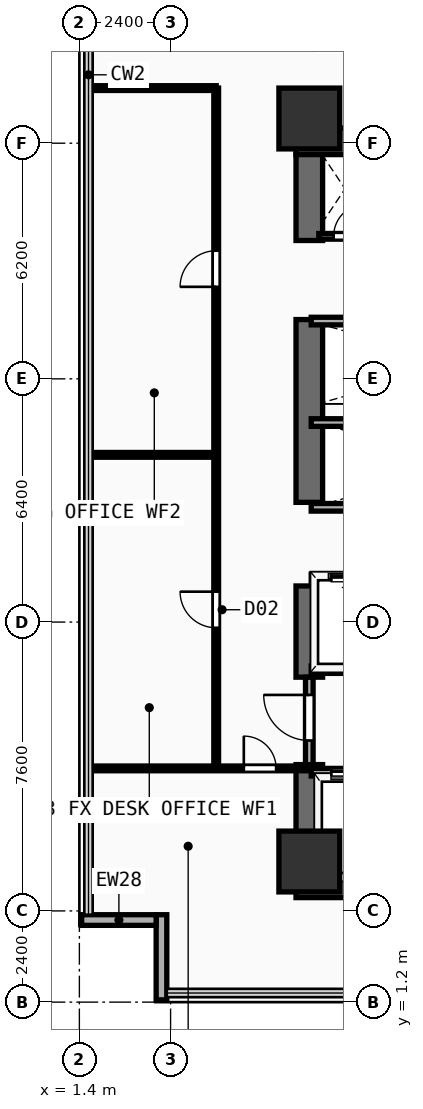
"""IFC4 building model, lengths in metres.
Left out: names, types, materials, properties, quantities, classifications, styles, units other than length and angle.
Written with IfcOpenShell. Run it as: python <this file> out.ifc"""

import sys

from ifc_helpers import new_model, si_unit, direction, frame, frame_2d, origin, origin_2d, place, context, subcontext, project, spatial, rectangle, extrude, element, fill, save


model = new_model("IFC4")
c1 = context("Model", 3, precision=1e-05, world=origin(), true_north=direction((0.0, 1.0)))
c2 = subcontext(c1, "Body", "Model", "MODEL_VIEW")
j1 = project(units=[si_unit("LENGTHUNIT", "METRE"), si_unit("PLANEANGLEUNIT", "RADIAN")], contexts=[c1])
p1 = place(None, origin())
s1 = spatial("IfcSite", under=j1, at=p1, CompositionType="ELEMENT")
p2 = place(p1, origin())
s2 = spatial("IfcBuilding", under=s1, at=p2, CompositionType="ELEMENT")
p3 = place(p2, frame((0.0, 0.0, 71.4)))
s3 = spatial("IfcBuildingStorey", under=s2, at=p3, CompositionType="ELEMENT", Elevation=71.4)
for number, where, z_axis, x_axis in (
    (1, (7.1, 4.3, 0.0), (0.0, 0.0, 1.0), (1.0, 0.0, 0.0)),
    (2, (7.1, 23.85, 0.0), (0.0, 0.0, 1.0), (1.0, 0.0, 0.0)),
):
    element("IfcWall", number, at=place(p3, frame(where, z_axis=z_axis, x_axis=x_axis)), inside=s3, PredefinedType="SHEAR", context=c2, shape_type="SweptSolid", body=[
        extrude(rectangle(XDim=14.05, YDim=0.7, at=frame_2d((7.025, 0.0))), origin(), (0.0, 0.0, 1.0), 3.54),
    ])
p4 = place(p3, frame((7.45, 4.65, 0.0), z_axis=(0.0, 0.0, 1.0), x_axis=(0.0, 1.0, 0.0)))
e3 = element("IfcWall", 3, at=p4, inside=s3, PredefinedType="SHEAR", context=c2, shape_type="SweptSolid", body=[
    extrude(rectangle(XDim=2.8, YDim=0.7, at=frame_2d((1.4, 0.0))), origin(), (0.0, 0.0, 1.0), 3.54),
])
p5 = place(p3, frame((7.45, 9.75, 0.0), z_axis=(0.0, 0.0, 1.0), x_axis=(0.0, 1.0, 0.0)))
e4 = element("IfcWall", 4, at=p5, inside=s3, PredefinedType="SHEAR", context=c2, shape_type="SweptSolid", body=[
    extrude(rectangle(XDim=2.4, YDim=0.7, at=frame_2d((1.2, 0.0))), origin(), (0.0, 0.0, 1.0), 3.54),
])
p6 = place(p3, frame((7.45, 14.35, 0.0), z_axis=(0.0, 0.0, 1.0), x_axis=(0.0, 1.0, 0.0)))
e5 = element("IfcWall", 5, at=p6, inside=s3, PredefinedType="SHEAR", context=c2, shape_type="SweptSolid", body=[
    extrude(rectangle(XDim=4.81, YDim=0.7, at=frame_2d((2.405, 0.0))), origin(), (0.0, 0.0, 1.0), 3.54),
])
p7 = place(p3, frame((7.45, 21.24, 0.0), z_axis=(0.0, 0.0, 1.0), x_axis=(0.0, 1.0, 0.0)))
e6 = element("IfcWall", 6, at=p7, inside=s3, PredefinedType="SHEAR", context=c2, shape_type="SweptSolid", body=[
    extrude(rectangle(XDim=2.26, YDim=0.7, at=frame_2d((1.13, 0.0))), origin(), (0.0, 0.0, 1.0), 3.54),
])
for number, where, z_axis, x_axis in (
    (7, (7.45, 4.9, 0.0), (0.0, 0.0, 1.0), (1.0, 0.0, 0.0)),
    (8, (7.45, 24.45, 0.0), (0.0, 0.0, 1.0), (1.0, 0.0, 0.0)),
):
    element("IfcColumn", number, at=place(p3, frame(where, z_axis=z_axis, x_axis=x_axis)), inside=s3, PredefinedType="COLUMN", context=c2, shape_type="SweptSolid", body=[
        extrude(rectangle(XDim=1.6, YDim=1.6, at=origin_2d()), origin(), (0.0, 0.0, 1.0), 3.54),
    ])
p8 = place(p3, frame((3.56, 1.26, 0.0), z_axis=(0.0, 0.0, 1.0), x_axis=(0.0, 1.0, 0.0)))
e9 = element("IfcWall", 9, at=p8, inside=s3, PredefinedType="SOLIDWALL", context=c2, shape_type="SweptSolid", body=[
    extrude(rectangle(XDim=2.24, YDim=0.28, at=frame_2d((1.12, 0.0))), origin(), (0.0, 0.0, 1.0), 3.54),
])
p9 = place(p3, frame((1.46, 3.36, 0.0), z_axis=(0.0, 0.0, 1.0), x_axis=(1.0, 0.0, 0.0)))
e10 = element("IfcWall", 10, at=p9, inside=s3, PredefinedType="SOLIDWALL", context=c2, shape_type="SweptSolid", body=[
    extrude(rectangle(XDim=1.96, YDim=0.28, at=frame_2d((0.98, 0.0))), origin(), (0.0, 0.0, 1.0), 3.54),
])
p10 = place(p3, frame((7.5, 7.25, 0.0), z_axis=(0.0, 0.0, 1.0), x_axis=(1.0, 0.0, 0.0)))
e11 = element("IfcWall", 11, at=p10, inside=s3, PredefinedType="PARTITIONING", context=c2, shape_type="SweptSolid", body=[
    extrude(rectangle(XDim=8.35, YDim=0.2, at=frame_2d((4.175, 0.0))), origin(), (0.0, 0.0, 1.0), 3.54),
])
p11 = place(p10, frame((0.53, 0.0, 0.0)))
e12 = element("IfcOpeningElement", 12, at=p11, cuts=e11, PredefinedType="OPENING", context=c2, shape_type="SweptSolid", body=[
    extrude(rectangle(XDim=1.1, YDim=2.2, at=frame_2d((0.55, 1.1))), frame((0.0, 0.11, 0.0), z_axis=(0.0, -1.0, 0.0), x_axis=(1.0, 0.0, 0.0)), (0.0, 0.0, 1.0), 0.22),
])
p12 = place(p10, frame((2.37, 0.0, 0.0)))
e13 = element("IfcOpeningElement", 13, at=p12, cuts=e11, PredefinedType="OPENING", context=c2, shape_type="SweptSolid", body=[
    extrude(rectangle(XDim=1.1, YDim=2.2, at=frame_2d((0.55, 1.1))), frame((0.0, 0.11, 0.0), z_axis=(0.0, -1.0, 0.0), x_axis=(1.0, 0.0, 0.0)), (0.0, 0.0, 1.0), 0.22),
])
p13 = place(p10, frame((4.33, 0.0, 0.0)))
e14 = element("IfcOpeningElement", 14, at=p13, cuts=e11, PredefinedType="OPENING", context=c2, shape_type="SweptSolid", body=[
    extrude(rectangle(XDim=1.1, YDim=2.2, at=frame_2d((0.55, 1.1))), frame((0.0, 0.11, 0.0), z_axis=(0.0, -1.0, 0.0), x_axis=(1.0, 0.0, 0.0)), (0.0, 0.0, 1.0), 0.22),
])
p14 = place(p10, frame((6.5, 0.0, 0.0)))
e15 = element("IfcOpeningElement", 15, at=p14, cuts=e11, PredefinedType="OPENING", context=c2, shape_type="SweptSolid", body=[
    extrude(rectangle(XDim=1.1, YDim=2.2, at=frame_2d((0.55, 1.1))), frame((0.0, 0.11, 0.0), z_axis=(0.0, -1.0, 0.0), x_axis=(1.0, 0.0, 0.0)), (0.0, 0.0, 1.0), 0.22),
])
p15 = place(p3, frame((7.5, 9.95, 0.0), z_axis=(0.0, 0.0, 1.0), x_axis=(1.0, 0.0, 0.0)))
e16 = element("IfcWall", 16, at=p15, inside=s3, PredefinedType="PARTITIONING", context=c2, shape_type="SweptSolid", body=[
    extrude(rectangle(XDim=8.35, YDim=0.2, at=frame_2d((4.175, 0.0))), origin(), (0.0, 0.0, 1.0), 3.54),
])
p16 = place(p3, frame((7.45, 7.45, 0.0), z_axis=(0.0, 0.0, 1.0), x_axis=(0.0, 1.0, 0.0)))
e17 = element("IfcWall", 17, at=p16, inside=s3, PredefinedType="PARTITIONING", context=c2, shape_type="SweptSolid", body=[
    extrude(rectangle(XDim=2.3, YDim=0.2, at=frame_2d((1.15, 0.0))), origin(), (0.0, 0.0, 1.0), 2.52),
])
p17 = place(p16, frame((0.633, 0.0, 0.0)))
e18 = element("IfcOpeningElement", 18, at=p17, cuts=e17, PredefinedType="OPENING", context=c2, shape_type="SweptSolid", body=[
    extrude(rectangle(XDim=1.2, YDim=2.25, at=frame_2d((0.6, 1.125))), frame((0.0, 0.11, 0.0), z_axis=(0.0, -1.0, 0.0), x_axis=(1.0, 0.0, 0.0)), (0.0, 0.0, 1.0), 0.22),
])
p18 = place(p3, frame((7.5, 12.36, 0.0), z_axis=(0.0, 0.0, 1.0), x_axis=(1.0, 0.0, 0.0)))
e19 = element("IfcWall", 19, at=p18, inside=s3, PredefinedType="PARTITIONING", context=c2, shape_type="SweptSolid", body=[
    extrude(rectangle(XDim=7.85, YDim=0.2, at=frame_2d((3.925, 0.0))), origin(), (0.0, 0.0, 1.0), 3.54),
])
p19 = place(p18, frame((0.53, 0.0, 0.0)))
e20 = element("IfcOpeningElement", 20, at=p19, cuts=e19, PredefinedType="OPENING", context=c2, shape_type="SweptSolid", body=[
    extrude(rectangle(XDim=1.1, YDim=2.2, at=frame_2d((0.55, 1.1))), frame((0.0, 0.11, 0.0), z_axis=(0.0, -1.0, 0.0), x_axis=(1.0, 0.0, 0.0)), (0.0, 0.0, 1.0), 0.22),
])
p20 = place(p18, frame((2.42, 0.0, 0.0)))
e21 = element("IfcOpeningElement", 21, at=p20, cuts=e19, PredefinedType="OPENING", context=c2, shape_type="SweptSolid", body=[
    extrude(rectangle(XDim=1.1, YDim=2.2, at=frame_2d((0.55, 1.1))), frame((0.0, 0.11, 0.0), z_axis=(0.0, -1.0, 0.0), x_axis=(1.0, 0.0, 0.0)), (0.0, 0.0, 1.0), 0.22),
])
p21 = place(p18, frame((4.31, 0.0, 0.0)))
e22 = element("IfcOpeningElement", 22, at=p21, cuts=e19, PredefinedType="OPENING", context=c2, shape_type="SweptSolid", body=[
    extrude(rectangle(XDim=1.1, YDim=2.2, at=frame_2d((0.55, 1.1))), frame((0.0, 0.11, 0.0), z_axis=(0.0, -1.0, 0.0), x_axis=(1.0, 0.0, 0.0)), (0.0, 0.0, 1.0), 0.22),
])
p22 = place(p18, frame((6.2, 0.0, 0.0)))
e23 = element("IfcOpeningElement", 23, at=p22, cuts=e19, PredefinedType="OPENING", context=c2, shape_type="SweptSolid", body=[
    extrude(rectangle(XDim=1.1, YDim=2.2, at=frame_2d((0.55, 1.1))), frame((0.0, 0.11, 0.0), z_axis=(0.0, -1.0, 0.0), x_axis=(1.0, 0.0, 0.0)), (0.0, 0.0, 1.0), 0.22),
])
for number, where, z_axis, x_axis in (
    (24, (7.5, 14.22, 0.0), (0.0, 0.0, 1.0), (1.0, 0.0, 0.0)),
    (25, (7.5, 16.45, 0.0), (0.0, 0.0, 1.0), (1.0, 0.0, 0.0)),
    (26, (7.5, 19.12, 0.0), (0.0, 0.0, 1.0), (1.0, 0.0, 0.0)),
):
    element("IfcWall", number, at=place(p3, frame(where, z_axis=z_axis, x_axis=x_axis)), inside=s3, PredefinedType="PARTITIONING", context=c2, shape_type="SweptSolid", body=[
        extrude(rectangle(XDim=7.85, YDim=0.2, at=frame_2d((3.925, 0.0))), origin(), (0.0, 0.0, 1.0), 3.54),
    ])
p23 = place(p3, frame((7.7, 21.35, 0.0), z_axis=(0.0, 0.0, 1.0), x_axis=(1.0, 0.0, 0.0)))
e27 = element("IfcWall", 27, at=p23, inside=s3, PredefinedType="PARTITIONING", context=c2, shape_type="SweptSolid", body=[
    extrude(rectangle(XDim=1.55, YDim=0.15, at=frame_2d((0.775, 0.0))), origin(), (0.0, 0.0, 1.0), 3.54),
])
p24 = place(p23, frame((0.39, 0.0, 0.0)))
e28 = element("IfcOpeningElement", 28, at=p24, cuts=e27, PredefinedType="OPENING", context=c2, shape_type="SweptSolid", body=[
    extrude(rectangle(XDim=0.85, YDim=2.15, at=frame_2d((0.425, 1.075))), frame((0.0, 0.085, 0.0), z_axis=(0.0, -1.0, 0.0), x_axis=(1.0, 0.0, 0.0)), (0.0, 0.0, 1.0), 0.17),
])
p25 = place(p3, frame((1.64, 7.35, 0.0), z_axis=(0.0, 0.0, 1.0), x_axis=(1.0, 0.0, 0.0)))
e29 = element("IfcWall", 29, at=p25, inside=s3, PredefinedType="PARTITIONING", context=c2, shape_type="SweptSolid", body=[
    extrude(rectangle(XDim=5.76, YDim=0.125, at=frame_2d((2.88, 0.0))), origin(), (0.0, 0.0, 1.0), 3.54),
])
p26 = place(p25, frame((4.087, 0.0, 0.0)))
e30 = element("IfcOpeningElement", 30, at=p26, cuts=e29, PredefinedType="OPENING", context=c2, shape_type="SweptSolid", body=[
    extrude(rectangle(XDim=0.85, YDim=2.15, at=frame_2d((0.425, 1.075))), frame((0.0, 0.073, 0.0), z_axis=(0.0, -1.0, 0.0), x_axis=(1.0, 0.0, 0.0)), (0.0, 0.0, 1.0), 0.145),
])
p27 = place(p3, frame((5.0, 7.5, 0.0), z_axis=(0.0, 0.0, 1.0), x_axis=(0.0, 1.0, 0.0)))
e31 = element("IfcWall", 31, at=p27, inside=s3, PredefinedType="PARTITIONING", context=c2, shape_type="SweptSolid", body=[
    extrude(rectangle(XDim=17.75, YDim=0.125, at=frame_2d((8.875, 0.0))), origin(), (0.0, 0.0, 1.0), 3.54),
])
p28 = place(p27, frame((3.55, 0.0, 0.0)))
e32 = element("IfcOpeningElement", 32, at=p28, cuts=e31, PredefinedType="OPENING", context=c2, shape_type="SweptSolid", body=[
    extrude(rectangle(XDim=0.95, YDim=2.15, at=frame_2d((0.475, 1.075))), frame((0.0, 0.073, 0.0), z_axis=(0.0, -1.0, 0.0), x_axis=(1.0, 0.0, 0.0)), (0.0, 0.0, 1.0), 0.145),
])
p29 = place(p27, frame((12.521, 0.0, 0.0)))
e33 = element("IfcOpeningElement", 33, at=p29, cuts=e31, PredefinedType="OPENING", context=c2, shape_type="SweptSolid", body=[
    extrude(rectangle(XDim=0.95, YDim=2.15, at=frame_2d((0.475, 1.075))), frame((0.0, 0.073, 0.0), z_axis=(0.0, -1.0, 0.0), x_axis=(1.0, 0.0, 0.0)), (0.0, 0.0, 1.0), 0.145),
])
for number, where, z_axis, x_axis in (
    (34, (1.64, 25.25, 0.0), (0.0, 0.0, 1.0), (1.0, 0.0, 0.0)),
    (35, (1.64, 15.6, 0.0), (0.0, 0.0, 1.0), (1.0, 0.0, 0.0)),
):
    element("IfcWall", number, at=place(p3, frame(where, z_axis=z_axis, x_axis=x_axis)), inside=s3, PredefinedType="PARTITIONING", context=c2, shape_type="SweptSolid", body=[
        extrude(rectangle(XDim=3.36, YDim=0.125, at=frame_2d((1.68, 0.0))), origin(), (0.0, 0.0, 1.0), 3.54),
    ])
p30 = place(p11, origin())
e36 = element("IfcDoor", 36, at=p30, inside=s3, OperationType="SLIDING_TO_LEFT", PredefinedType="DOOR", context=c2, shape_type="SweptSolid", body=[
    extrude(rectangle(XDim=1.1, YDim=2.2, at=frame_2d((0.55, 1.1))), frame((0.0, 0.025, 0.0), z_axis=(0.0, -1.0, 0.0), x_axis=(1.0, 0.0, 0.0)), (0.0, 0.0, 1.0), 0.05),
])
fill(e12, e36)
p31 = place(p17, frame((1.2, 0.0, 0.0), z_axis=(0.0, 0.0, 1.0), x_axis=(-1.0, 0.0, 0.0)))
e37 = element("IfcDoor", 37, at=p31, inside=s3, OperationType="SINGLE_SWING_LEFT", PredefinedType="DOOR", context=c2, shape_type="SweptSolid", body=[
    extrude(rectangle(XDim=1.2, YDim=2.25, at=frame_2d((0.6, 1.125))), frame((0.0, 0.025, 0.0), z_axis=(0.0, -1.0, 0.0), x_axis=(1.0, 0.0, 0.0)), (0.0, 0.0, 1.0), 0.05),
])
fill(e18, e37)
p32 = place(p19, origin())
e38 = element("IfcDoor", 38, at=p32, inside=s3, OperationType="SLIDING_TO_LEFT", PredefinedType="DOOR", context=c2, shape_type="SweptSolid", body=[
    extrude(rectangle(XDim=1.1, YDim=2.2, at=frame_2d((0.55, 1.1))), frame((0.0, 0.025, 0.0), z_axis=(0.0, -1.0, 0.0), x_axis=(1.0, 0.0, 0.0)), (0.0, 0.0, 1.0), 0.05),
])
fill(e20, e38)
p33 = place(p24, origin())
e39 = element("IfcDoor", 39, at=p33, inside=s3, OperationType="SINGLE_SWING_RIGHT", PredefinedType="DOOR", context=c2, shape_type="SweptSolid", body=[
    extrude(rectangle(XDim=0.85, YDim=2.15, at=frame_2d((0.425, 1.075))), frame((0.0, 0.025, 0.0), z_axis=(0.0, -1.0, 0.0), x_axis=(1.0, 0.0, 0.0)), (0.0, 0.0, 1.0), 0.05),
])
fill(e28, e39)
p34 = place(p26, origin())
e40 = element("IfcDoor", 40, at=p34, inside=s3, OperationType="SINGLE_SWING_LEFT", PredefinedType="DOOR", context=c2, shape_type="SweptSolid", body=[
    extrude(rectangle(XDim=0.85, YDim=2.15, at=frame_2d((0.425, 1.075))), frame((0.0, 0.025, 0.0), z_axis=(0.0, -1.0, 0.0), x_axis=(1.0, 0.0, 0.0)), (0.0, 0.0, 1.0), 0.05),
])
fill(e30, e40)
p35 = place(p28, origin())
e41 = element("IfcDoor", 41, at=p35, inside=s3, OperationType="SINGLE_SWING_RIGHT", PredefinedType="DOOR", context=c2, shape_type="SweptSolid", body=[
    extrude(rectangle(XDim=0.95, YDim=2.15, at=frame_2d((0.475, 1.075))), frame((0.0, 0.025, 0.0), z_axis=(0.0, -1.0, 0.0), x_axis=(1.0, 0.0, 0.0)), (0.0, 0.0, 1.0), 0.05),
])
fill(e32, e41)
p36 = place(p29, origin())
e42 = element("IfcDoor", 42, at=p36, inside=s3, OperationType="SINGLE_SWING_LEFT", PredefinedType="DOOR", context=c2, shape_type="SweptSolid", body=[
    extrude(rectangle(XDim=0.95, YDim=2.15, at=frame_2d((0.475, 1.075))), frame((0.0, 0.025, 0.0), z_axis=(0.0, -1.0, 0.0), x_axis=(1.0, 0.0, 0.0)), (0.0, 0.0, 1.0), 0.05),
])
fill(e33, e42)
save(model, sys.argv[1])
